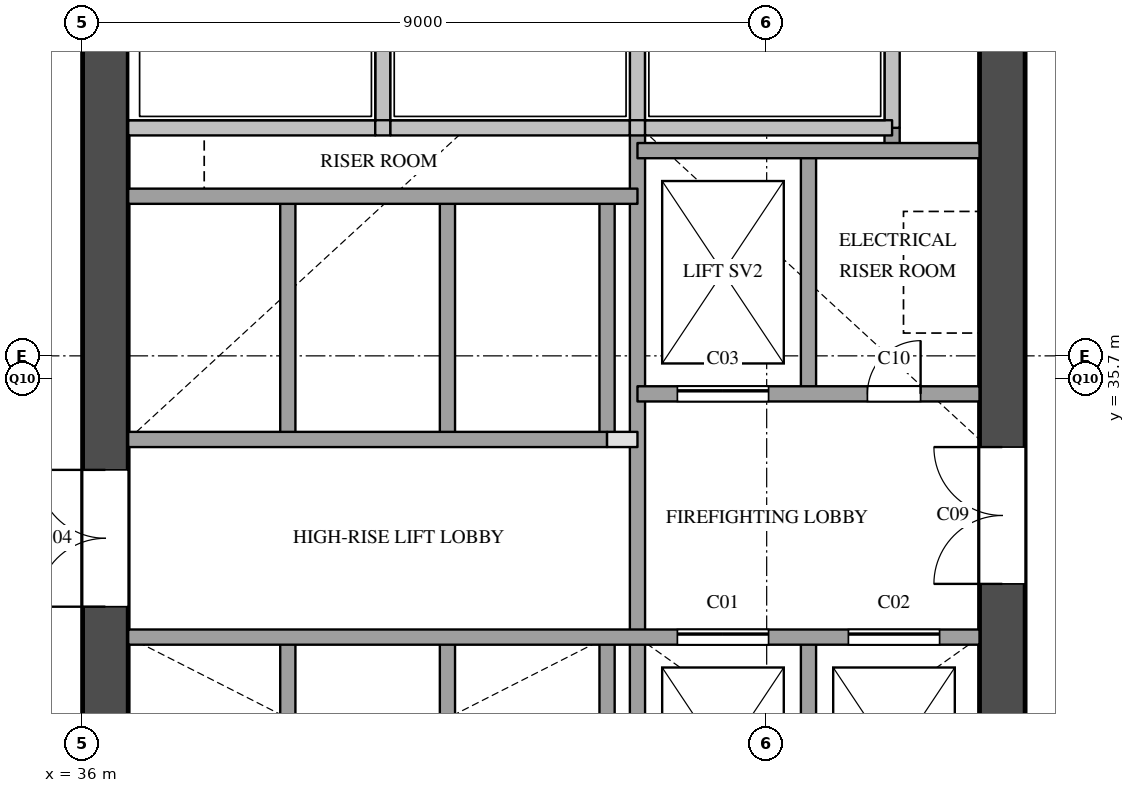
"""IFC4 building model, lengths in metres.
Left out: names, types, materials, properties, quantities, classifications, styles, units other than length and angle.
Written with IfcOpenShell. Run it as: python <this file> out.ifc"""

import sys

from ifc_helpers import new_model, si_unit, direction, frame, frame_2d, origin, place, context, subcontext, project, spatial, rectangle, extrude, element, fill, save


model = new_model("IFC4")
c1 = context("Model", 3, precision=1e-05, world=origin(), true_north=direction((0.0, 1.0)))
c2 = subcontext(c1, "Body", "Model", "MODEL_VIEW")
j1 = project(units=[si_unit("LENGTHUNIT", "METRE"), si_unit("PLANEANGLEUNIT", "RADIAN")], contexts=[c1])
p1 = place(None, origin())
s1 = spatial("IfcSite", under=j1, at=p1, CompositionType="ELEMENT")
p2 = place(p1, origin())
s2 = spatial("IfcBuilding", under=s1, at=p2, CompositionType="ELEMENT")
p3 = place(p2, frame((0.0, 0.0, 61.4)))
s3 = spatial("IfcBuildingStorey", under=s2, at=p3, CompositionType="ELEMENT", Elevation=61.4)
p4 = place(p3, frame((36.3, 29.1, 0.0), z_axis=(0.0, 0.0, 1.0), x_axis=(0.0, 1.0, 0.0)))
e1 = element("IfcWall", 1, at=p4, inside=s3, PredefinedType="SHEAR", context=c2, shape_type="SweptSolid", body=[
    extrude(rectangle(XDim=20.3, YDim=0.6, at=frame_2d((10.15, 0.0))), origin(), (0.0, 0.0, 1.0), 3.5),
])
p5 = place(p4, frame((3.6, 0.0, 0.0)))
e2 = element("IfcOpeningElement", 2, at=p5, cuts=e1, PredefinedType="OPENING", context=c2, shape_type="SweptSolid", body=[
    extrude(rectangle(XDim=1.8, YDim=2.1, at=frame_2d((0.9, 1.05))), frame((0.0, 0.31, 0.0), z_axis=(0.0, -1.0, 0.0), x_axis=(1.0, 0.0, 0.0)), (0.0, 0.0, 1.0), 0.62),
])
p6 = place(p4, frame((16.4, 0.0, 0.0)))
e3 = element("IfcOpeningElement", 3, at=p6, cuts=e1, PredefinedType="OPENING", context=c2, shape_type="SweptSolid", body=[
    extrude(rectangle(XDim=1.0, YDim=2.1, at=frame_2d((0.5, 1.05))), frame((0.0, 0.31, 0.0), z_axis=(0.0, -1.0, 0.0), x_axis=(1.0, 0.0, 0.0)), (0.0, 0.0, 1.0), 0.62),
])
p7 = place(p3, frame((48.1, 29.1, 0.0), z_axis=(0.0, 0.0, 1.0), x_axis=(0.0, 1.0, 0.0)))
e4 = element("IfcWall", 4, at=p7, inside=s3, PredefinedType="SHEAR", context=c2, shape_type="SweptSolid", body=[
    extrude(rectangle(XDim=20.3, YDim=0.6, at=frame_2d((10.15, 0.0))), origin(), (0.0, 0.0, 1.0), 3.5),
])
p8 = place(p7, frame((12.5, 0.0, 0.0)))
e5 = element("IfcOpeningElement", 5, at=p8, cuts=e4, PredefinedType="OPENING", context=c2, shape_type="SweptSolid", body=[
    extrude(rectangle(XDim=0.7, YDim=2.1, at=frame_2d((0.35, 1.05))), frame((0.0, 0.31, 0.0), z_axis=(0.0, -1.0, 0.0), x_axis=(1.0, 0.0, 0.0)), (0.0, 0.0, 1.0), 0.62),
])
p9 = place(p7, frame((3.9, 0.0, 0.0)))
e6 = element("IfcOpeningElement", 6, at=p9, cuts=e4, PredefinedType="OPENING", context=c2, shape_type="SweptSolid", body=[
    extrude(rectangle(XDim=1.8, YDim=2.1, at=frame_2d((0.9, 1.05))), frame((0.0, 0.31, 0.0), z_axis=(0.0, -1.0, 0.0), x_axis=(1.0, 0.0, 0.0)), (0.0, 0.0, 1.0), 0.62),
])
p10 = place(p3, frame((38.7, 29.1, 0.0), z_axis=(0.0, 0.0, 1.0), x_axis=(0.0, 1.0, 0.0)))
e7 = element("IfcWall", 7, at=p10, inside=s3, PredefinedType="SOLIDWALL", context=c2, shape_type="SweptSolid", body=[
    extrude(rectangle(XDim=3.2, YDim=0.2, at=frame_2d((1.6, 0.0))), origin(), (0.0, 0.0, 1.0), 3.5),
])
p11 = place(p3, frame((38.7, 34.9, 0.0), z_axis=(0.0, 0.0, 1.0), x_axis=(0.0, 1.0, 0.0)))
e8 = element("IfcWall", 8, at=p11, inside=s3, PredefinedType="SOLIDWALL", context=c2, shape_type="SweptSolid", body=[
    extrude(rectangle(XDim=3.2, YDim=0.2, at=frame_2d((1.6, 0.0))), origin(), (0.0, 0.0, 1.0), 3.5),
])
p12 = place(p3, frame((39.95, 39.0, 0.0), z_axis=(0.0, 0.0, 1.0), x_axis=(0.0, 1.0, 0.0)))
e9 = element("IfcWall", 9, at=p12, inside=s3, PredefinedType="SOLIDWALL", context=c2, shape_type="SweptSolid", body=[
    extrude(rectangle(XDim=1.78, YDim=0.2, at=frame_2d((0.89, 0.0))), origin(), (0.0, 0.0, 1.0), 3.5),
])
p13 = place(p3, frame((40.8, 29.1, 0.0), z_axis=(0.0, 0.0, 1.0), x_axis=(0.0, 1.0, 0.0)))
e10 = element("IfcWall", 10, at=p13, inside=s3, PredefinedType="SOLIDWALL", context=c2, shape_type="SweptSolid", body=[
    extrude(rectangle(XDim=3.2, YDim=0.2, at=frame_2d((1.6, 0.0))), origin(), (0.0, 0.0, 1.0), 3.5),
])
p14 = place(p3, frame((40.8, 34.9, 0.0), z_axis=(0.0, 0.0, 1.0), x_axis=(0.0, 1.0, 0.0)))
e11 = element("IfcWall", 11, at=p14, inside=s3, PredefinedType="SOLIDWALL", context=c2, shape_type="SweptSolid", body=[
    extrude(rectangle(XDim=3.2, YDim=0.2, at=frame_2d((1.6, 0.0))), origin(), (0.0, 0.0, 1.0), 3.5),
])
p15 = place(p3, frame((42.9, 29.1, 0.0), z_axis=(0.0, 0.0, 1.0), x_axis=(0.0, 1.0, 0.0)))
e12 = element("IfcWall", 12, at=p15, inside=s3, PredefinedType="SOLIDWALL", context=c2, shape_type="SweptSolid", body=[
    extrude(rectangle(XDim=3.2, YDim=0.2, at=frame_2d((1.6, 0.0))), origin(), (0.0, 0.0, 1.0), 3.5),
])
p16 = place(p3, frame((42.9, 34.9, 0.0), z_axis=(0.0, 0.0, 1.0), x_axis=(0.0, 1.0, 0.0)))
e13 = element("IfcWall", 13, at=p16, inside=s3, PredefinedType="SOLIDWALL", context=c2, shape_type="SweptSolid", body=[
    extrude(rectangle(XDim=3.2, YDim=0.2, at=frame_2d((1.6, 0.0))), origin(), (0.0, 0.0, 1.0), 3.5),
])
p17 = place(p3, frame((43.3, 29.1, 0.0), z_axis=(0.0, 0.0, 1.0), x_axis=(0.0, 1.0, 0.0)))
e14 = element("IfcWall", 14, at=p17, inside=s3, PredefinedType="SOLIDWALL", context=c2, shape_type="SweptSolid", body=[
    extrude(rectangle(XDim=9.9, YDim=0.2, at=frame_2d((4.95, 0.0))), origin(), (0.0, 0.0, 1.0), 3.5),
])
p18 = place(p3, frame((43.3, 39.0, 0.0), z_axis=(0.0, 0.0, 1.0), x_axis=(0.0, 1.0, 0.0)))
e15 = element("IfcWall", 15, at=p18, inside=s3, PredefinedType="SOLIDWALL", context=c2, shape_type="SweptSolid", body=[
    extrude(rectangle(XDim=1.78, YDim=0.2, at=frame_2d((0.89, 0.0))), origin(), (0.0, 0.0, 1.0), 3.5),
])
for number, where, z_axis, x_axis in (
    (16, (45.55, 29.1, 0.0), (0.0, 0.0, 1.0), (0.0, 1.0, 0.0)),
    (17, (45.55, 35.5, 0.0), (0.0, 0.0, 1.0), (0.0, 1.0, 0.0)),
):
    element("IfcWall", number, at=place(p3, frame(where, z_axis=z_axis, x_axis=x_axis)), inside=s3, PredefinedType="SOLIDWALL", context=c2, shape_type="SweptSolid", body=[
        extrude(rectangle(XDim=3.2, YDim=0.2, at=frame_2d((1.6, 0.0))), origin(), (0.0, 0.0, 1.0), 3.5),
    ])
p19 = place(p3, frame((46.65, 38.7, 0.0), z_axis=(0.0, 0.0, 1.0), x_axis=(0.0, 1.0, 0.0)))
e18 = element("IfcWall", 18, at=p19, inside=s3, PredefinedType="SOLIDWALL", context=c2, shape_type="SweptSolid", body=[
    extrude(rectangle(XDim=0.3, YDim=0.2, at=frame_2d((0.15, 0.0))), origin(), (0.0, 0.0, 1.0), 3.5),
])
p20 = place(p3, frame((46.65, 39.0, 0.0), z_axis=(0.0, 0.0, 1.0), x_axis=(0.0, 1.0, 0.0)))
e19 = element("IfcWall", 19, at=p20, inside=s3, PredefinedType="SOLIDWALL", context=c2, shape_type="SweptSolid", body=[
    extrude(rectangle(XDim=1.78, YDim=0.2, at=frame_2d((0.89, 0.0))), origin(), (0.0, 0.0, 1.0), 3.5),
])
p21 = place(p3, frame((36.6, 32.3, 0.0), z_axis=(0.0, 0.0, 1.0), x_axis=(1.0, 0.0, 0.0)))
e20 = element("IfcWall", 20, at=p21, inside=s3, PredefinedType="SOLIDWALL", context=c2, shape_type="SweptSolid", body=[
    extrude(rectangle(XDim=11.2, YDim=0.2, at=frame_2d((5.6, 0.0))), origin(), (0.0, 0.0, 1.0), 3.5),
])
p22 = place(p21, frame((7.225, 0.0, 0.0)))
e21 = element("IfcOpeningElement", 21, at=p22, cuts=e20, PredefinedType="OPENING", context=c2, shape_type="SweptSolid", body=[
    extrude(rectangle(XDim=1.2, YDim=2.1, at=frame_2d((0.6, 1.05))), frame((0.0, 0.11, 0.0), z_axis=(0.0, -1.0, 0.0), x_axis=(1.0, 0.0, 0.0)), (0.0, 0.0, 1.0), 0.22),
])
p23 = place(p21, frame((9.475, 0.0, 0.0)))
e22 = element("IfcOpeningElement", 22, at=p23, cuts=e20, PredefinedType="OPENING", context=c2, shape_type="SweptSolid", body=[
    extrude(rectangle(XDim=1.2, YDim=2.1, at=frame_2d((0.6, 1.05))), frame((0.0, 0.11, 0.0), z_axis=(0.0, -1.0, 0.0), x_axis=(1.0, 0.0, 0.0)), (0.0, 0.0, 1.0), 0.22),
])
p24 = place(p3, frame((42.9, 34.9, 0.0), z_axis=(0.0, 0.0, 1.0), x_axis=(1.0, 0.0, 0.0)))
e23 = element("IfcWall", 23, at=p24, inside=s3, PredefinedType="PARTITIONING", context=c2, shape_type="SweptSolid", body=[
    extrude(rectangle(XDim=0.4, YDim=0.2, at=frame_2d((0.2, 0.0))), origin(), (0.0, 0.0, 1.0), 3.5),
])
p25 = place(p3, frame((36.6, 34.9, 0.0), z_axis=(0.0, 0.0, 1.0), x_axis=(1.0, 0.0, 0.0)))
e24 = element("IfcWall", 24, at=p25, inside=s3, PredefinedType="SOLIDWALL", context=c2, shape_type="SweptSolid", body=[
    extrude(rectangle(XDim=6.3, YDim=0.2, at=frame_2d((3.15, 0.0))), origin(), (0.0, 0.0, 1.0), 3.5),
])
p26 = place(p3, frame((43.3, 35.5, 0.0), z_axis=(0.0, 0.0, 1.0), x_axis=(1.0, 0.0, 0.0)))
e25 = element("IfcWall", 25, at=p26, inside=s3, PredefinedType="SOLIDWALL", context=c2, shape_type="SweptSolid", body=[
    extrude(rectangle(XDim=4.5, YDim=0.2, at=frame_2d((2.25, 0.0))), origin(), (0.0, 0.0, 1.0), 3.5),
])
p27 = place(p26, frame((0.525, 0.0, 0.0)))
e26 = element("IfcOpeningElement", 26, at=p27, cuts=e25, PredefinedType="OPENING", context=c2, shape_type="SweptSolid", body=[
    extrude(rectangle(XDim=1.2, YDim=2.1, at=frame_2d((0.6, 1.05))), frame((0.0, 0.11, 0.0), z_axis=(0.0, -1.0, 0.0), x_axis=(1.0, 0.0, 0.0)), (0.0, 0.0, 1.0), 0.22),
])
p28 = place(p26, frame((3.025, 0.0, 0.0)))
e27 = element("IfcOpeningElement", 27, at=p28, cuts=e25, PredefinedType="OPENING", context=c2, shape_type="SweptSolid", body=[
    extrude(rectangle(XDim=0.7, YDim=2.1, at=frame_2d((0.35, 1.05))), frame((0.0, 0.11, 0.0), z_axis=(0.0, -1.0, 0.0), x_axis=(1.0, 0.0, 0.0)), (0.0, 0.0, 1.0), 0.22),
])
p29 = place(p3, frame((36.6, 38.1, 0.0), z_axis=(0.0, 0.0, 1.0), x_axis=(1.0, 0.0, 0.0)))
e28 = element("IfcWall", 28, at=p29, inside=s3, PredefinedType="SOLIDWALL", context=c2, shape_type="SweptSolid", body=[
    extrude(rectangle(XDim=6.7, YDim=0.2, at=frame_2d((3.35, 0.0))), origin(), (0.0, 0.0, 1.0), 3.5),
])
p30 = place(p3, frame((43.3, 38.7, 0.0), z_axis=(0.0, 0.0, 1.0), x_axis=(1.0, 0.0, 0.0)))
e29 = element("IfcWall", 29, at=p30, inside=s3, PredefinedType="SOLIDWALL", context=c2, shape_type="SweptSolid", body=[
    extrude(rectangle(XDim=4.5, YDim=0.2, at=frame_2d((2.25, 0.0))), origin(), (0.0, 0.0, 1.0), 3.5),
])
p31 = place(p3, frame((36.6, 39.0, 0.0), z_axis=(0.0, 0.0, 1.0), x_axis=(1.0, 0.0, 0.0)))
e30 = element("IfcWall", 30, at=p31, inside=s3, PredefinedType="SOLIDWALL", context=c2, shape_type="SweptSolid", body=[
    extrude(rectangle(XDim=3.25, YDim=0.2, at=frame_2d((1.625, 0.0))), origin(), (0.0, 0.0, 1.0), 3.5),
])
p32 = place(p3, frame((39.85, 39.0, 0.0), z_axis=(0.0, 0.0, 1.0), x_axis=(1.0, 0.0, 0.0)))
e31 = element("IfcWall", 31, at=p32, inside=s3, PredefinedType="SOLIDWALL", context=c2, shape_type="SweptSolid", body=[
    extrude(rectangle(XDim=0.2, YDim=0.2, at=frame_2d((0.1, 0.0))), origin(), (0.0, 0.0, 1.0), 3.5),
])
p33 = place(p3, frame((40.05, 39.0, 0.0), z_axis=(0.0, 0.0, 1.0), x_axis=(1.0, 0.0, 0.0)))
e32 = element("IfcWall", 32, at=p33, inside=s3, PredefinedType="SOLIDWALL", context=c2, shape_type="SweptSolid", body=[
    extrude(rectangle(XDim=3.15, YDim=0.2, at=frame_2d((1.575, 0.0))), origin(), (0.0, 0.0, 1.0), 3.5),
])
p34 = place(p3, frame((43.2, 39.0, 0.0), z_axis=(0.0, 0.0, 1.0), x_axis=(1.0, 0.0, 0.0)))
e33 = element("IfcWall", 33, at=p34, inside=s3, PredefinedType="SOLIDWALL", context=c2, shape_type="SweptSolid", body=[
    extrude(rectangle(XDim=0.2, YDim=0.2, at=frame_2d((0.1, 0.0))), origin(), (0.0, 0.0, 1.0), 3.5),
])
p35 = place(p3, frame((43.4, 39.0, 0.0), z_axis=(0.0, 0.0, 1.0), x_axis=(1.0, 0.0, 0.0)))
e34 = element("IfcWall", 34, at=p35, inside=s3, PredefinedType="SOLIDWALL", context=c2, shape_type="SweptSolid", body=[
    extrude(rectangle(XDim=3.25, YDim=0.2, at=frame_2d((1.625, 0.0))), origin(), (0.0, 0.0, 1.0), 3.5),
])
p36 = place(p22, origin())
e35 = element("IfcDoor", 35, at=p36, inside=s3, OperationType="SLIDING_TO_LEFT", PredefinedType="DOOR", context=c2, shape_type="SweptSolid", body=[
    extrude(rectangle(XDim=1.2, YDim=2.1, at=frame_2d((0.6, 1.05))), frame((0.0, 0.025, 0.0), z_axis=(0.0, -1.0, 0.0), x_axis=(1.0, 0.0, 0.0)), (0.0, 0.0, 1.0), 0.05),
])
fill(e21, e35)
p37 = place(p23, origin())
e36 = element("IfcDoor", 36, at=p37, inside=s3, OperationType="SLIDING_TO_LEFT", PredefinedType="DOOR", context=c2, shape_type="SweptSolid", body=[
    extrude(rectangle(XDim=1.2, YDim=2.1, at=frame_2d((0.6, 1.05))), frame((0.0, 0.025, 0.0), z_axis=(0.0, -1.0, 0.0), x_axis=(1.0, 0.0, 0.0)), (0.0, 0.0, 1.0), 0.05),
])
fill(e22, e36)
p38 = place(p27, origin())
e37 = element("IfcDoor", 37, at=p38, inside=s3, OperationType="SLIDING_TO_LEFT", PredefinedType="DOOR", context=c2, shape_type="SweptSolid", body=[
    extrude(rectangle(XDim=1.2, YDim=2.1, at=frame_2d((0.6, 1.05))), frame((0.0, 0.025, 0.0), z_axis=(0.0, -1.0, 0.0), x_axis=(1.0, 0.0, 0.0)), (0.0, 0.0, 1.0), 0.05),
])
fill(e26, e37)
p39 = place(p5, origin())
e38 = element("IfcDoor", 38, at=p39, inside=s3, OperationType="DOUBLE_DOOR_SINGLE_SWING", PredefinedType="DOOR", context=c2, shape_type="SweptSolid", body=[
    extrude(rectangle(XDim=1.8, YDim=2.1, at=frame_2d((0.9, 1.05))), frame((0.0, 0.025, 0.0), z_axis=(0.0, -1.0, 0.0), x_axis=(1.0, 0.0, 0.0)), (0.0, 0.0, 1.0), 0.05),
])
fill(e2, e38)
p40 = place(p9, origin())
e39 = element("IfcDoor", 39, at=p40, inside=s3, OperationType="DOUBLE_DOOR_SINGLE_SWING", PredefinedType="DOOR", context=c2, shape_type="SweptSolid", body=[
    extrude(rectangle(XDim=1.8, YDim=2.1, at=frame_2d((0.9, 1.05))), frame((0.0, 0.025, 0.0), z_axis=(0.0, -1.0, 0.0), x_axis=(1.0, 0.0, 0.0)), (0.0, 0.0, 1.0), 0.05),
])
fill(e6, e39)
p41 = place(p28, origin())
e40 = element("IfcDoor", 40, at=p41, inside=s3, OperationType="SINGLE_SWING_RIGHT", PredefinedType="DOOR", context=c2, shape_type="SweptSolid", body=[
    extrude(rectangle(XDim=0.7, YDim=2.1, at=frame_2d((0.35, 1.05))), frame((0.0, 0.025, 0.0), z_axis=(0.0, -1.0, 0.0), x_axis=(1.0, 0.0, 0.0)), (0.0, 0.0, 1.0), 0.05),
])
fill(e27, e40)
save(model, sys.argv[1])
